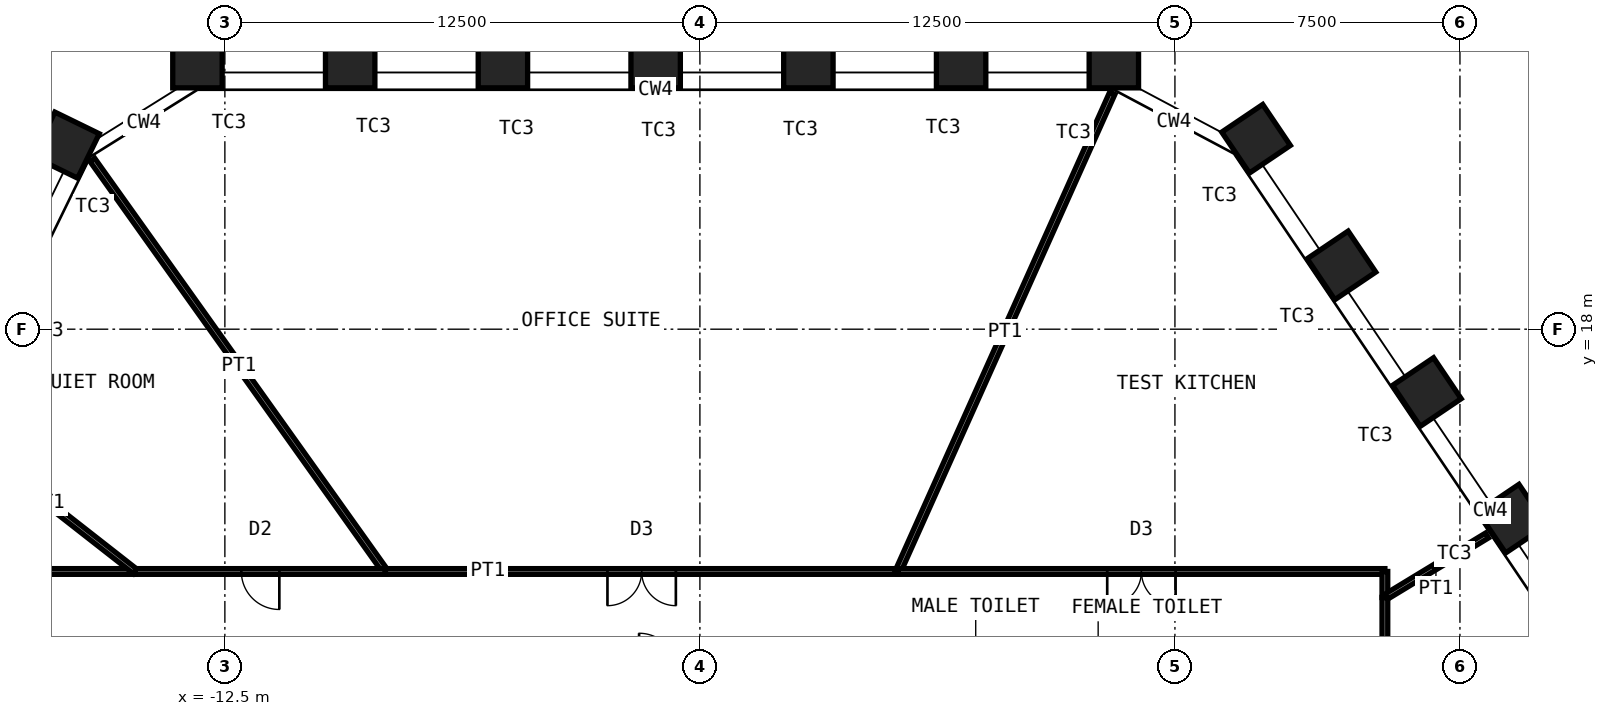
"""IFC4 building model, lengths in metres.
Left out: names, types, materials, properties, quantities, classifications, styles, units other than length and angle.
Written with IfcOpenShell. Run it as: python <this file> out.ifc"""

import sys

from ifc_helpers import new_model, si_unit, direction, frame, frame_2d, origin, origin_2d, place, context, subcontext, project, spatial, rectangle, hollow_rectangle, extrude, element, fill, save


model = new_model("IFC4")
c1 = context("Model", 3, precision=1e-05, world=origin(), true_north=direction((0.0, 1.0)))
c2 = subcontext(c1, "Body", "Model", "MODEL_VIEW")
j1 = project(units=[si_unit("LENGTHUNIT", "METRE"), si_unit("PLANEANGLEUNIT", "RADIAN")], contexts=[c1])
p1 = place(None, origin())
s1 = spatial("IfcSite", under=j1, at=p1, CompositionType="ELEMENT")
p2 = place(p1, origin())
s2 = spatial("IfcBuilding", under=s1, at=p2, CompositionType="ELEMENT")
p3 = place(p2, frame((0.0, 0.0, 119.8)))
s3 = spatial("IfcBuildingStorey", under=s2, at=p3, CompositionType="ELEMENT", Elevation=119.8)
for number, where, z_axis, x_axis in (
    (1, (-13.222, 25.0, 0.0), (0.0, 0.0, 1.0), (-1.0, 0.0, 0.0)),
    (2, (-9.203, 25.0, 0.0), (0.0, 0.0, 1.0), (-1.0, 0.0, 0.0)),
    (3, (-5.184, 25.0, 0.0), (0.0, 0.0, 1.0), (-1.0, 0.0, 0.0)),
    (4, (-1.165, 25.0, 0.0), (0.0, 0.0, 1.0), (-1.0, 0.0, 0.0)),
    (5, (2.854, 25.0, 0.0), (0.0, 0.0, 1.0), (-1.0, 0.0, 0.0)),
    (6, (6.874, 25.0, 0.0), (0.0, 0.0, 1.0), (-1.0, 0.0, 0.0)),
    (7, (10.893, 25.0, 0.0), (0.0, 0.0, 1.0), (-1.0, 0.0, 0.0)),
    (8, (14.635, 23.01, 0.0), (0.0, 0.0, 1.0), (-0.559, 0.829, 0.0)),
    (9, (16.882, 19.678, 0.0), (0.0, 0.0, 1.0), (-0.559, 0.829, 0.0)),
    (10, (19.13, 16.346, 0.0), (0.0, 0.0, 1.0), (-0.559, 0.829, 0.0)),
    (11, (21.377, 13.014, 0.0), (0.0, 0.0, 1.0), (-0.559, 0.829, 0.0)),
    (12, (-16.674, 22.843, 0.0), (0.0, 0.0, 1.0), (-0.438, -0.899, 0.0)),
):
    element("IfcColumn", number, at=place(p3, frame(where, z_axis=z_axis, x_axis=x_axis)), inside=s3, PredefinedType="COLUMN", context=c2, shape_type="SweptSolid", body=[
        extrude(hollow_rectangle(XDim=1.3, YDim=1.3, WallThickness=0.1, at=origin_2d()), origin(), (0.0, 0.0, 1.0), 4.2),
    ])
p4 = place(p3, frame((-15.987, 22.455, 0.0), z_axis=(0.0, 0.0, 1.0), x_axis=(0.579969304452, -0.814638328274, 0.0)))
e13 = element("IfcWall", 13, at=p4, inside=s3, PredefinedType="PARTITIONING", context=c2, shape_type="SweptSolid", body=[
    extrude(rectangle(XDim=13.294, YDim=0.15, at=frame_2d((6.647, 0.0))), origin(), (0.0, 0.0, 1.0), 2.93),
])
p5 = place(p3, frame((-8.277, 11.625, 0.0), z_axis=(0.0, 0.0, 1.0), x_axis=(1.0, 0.0, 0.0)))
e14 = element("IfcWall", 14, at=p5, inside=s3, PredefinedType="PARTITIONING", context=c2, shape_type="SweptSolid", body=[
    extrude(rectangle(XDim=13.488, YDim=0.15, at=frame_2d((6.744, 0.0))), origin(), (0.0, 0.0, 1.0), 4.03),
])
p6 = place(p5, frame((5.844, 0.0, 0.0)))
e15 = element("IfcOpeningElement", 15, at=p6, cuts=e14, PredefinedType="OPENING", context=c2, shape_type="SweptSolid", body=[
    extrude(rectangle(XDim=1.8, YDim=2.4, at=frame_2d((0.9, 1.2))), frame((0.0, 0.085, 0.0), z_axis=(0.0, -1.0, 0.0), x_axis=(1.0, 0.0, 0.0)), (0.0, 0.0, 1.0), 0.17),
])
p7 = place(p3, frame((10.852, 24.209, 0.0), z_axis=(0.0, 0.0, 1.0), x_axis=(-0.40904878746, -0.912512514696, 0.0)))
e16 = element("IfcWall", 16, at=p7, inside=s3, PredefinedType="PARTITIONING", context=c2, shape_type="SweptSolid", body=[
    extrude(rectangle(XDim=13.79, YDim=0.15, at=frame_2d((6.895, 0.0))), origin(), (0.0, 0.0, 1.0), 2.93),
])
p8 = place(p3, frame((5.211, 11.625, 0.0), z_axis=(0.0, 0.0, 1.0), x_axis=(1.0, 0.0, 0.0)))
e17 = element("IfcWall", 17, at=p8, inside=s3, PredefinedType="PARTITIONING", context=c2, shape_type="SweptSolid", body=[
    extrude(rectangle(XDim=12.814, YDim=0.15, at=frame_2d((6.407, 0.0))), origin(), (0.0, 0.0, 1.0), 4.03),
])
p9 = place(p8, frame((5.507, 0.0, 0.0)))
e18 = element("IfcOpeningElement", 18, at=p9, cuts=e17, PredefinedType="OPENING", context=c2, shape_type="SweptSolid", body=[
    extrude(rectangle(XDim=1.8, YDim=2.4, at=frame_2d((0.9, 1.2))), frame((0.0, 0.085, 0.0), z_axis=(0.0, -1.0, 0.0), x_axis=(1.0, 0.0, 0.0)), (0.0, 0.0, 1.0), 0.17),
])
p10 = place(p3, frame((18.025, 11.625, 0.0), z_axis=(0.0, 0.0, 1.0), x_axis=(0.0, -1.0, 0.0)))
e19 = element("IfcWall", 19, at=p10, inside=s3, PredefinedType="PARTITIONING", context=c2, shape_type="SweptSolid", body=[
    extrude(rectangle(XDim=0.684, YDim=0.15, at=frame_2d((0.342, 0.0))), origin(), (0.0, 0.0, 1.0), 4.03),
])
p11 = place(p3, frame((20.711, 12.571, 0.0), z_axis=(0.0, 0.0, 1.0), x_axis=(-0.854890890653, -0.518807830587, 0.0)))
e20 = element("IfcWall", 20, at=p11, inside=s3, PredefinedType="PARTITIONING", context=c2, shape_type="SweptSolid", body=[
    extrude(rectangle(XDim=3.143, YDim=0.15, at=frame_2d((1.571, 0.0))), origin(), (0.0, 0.0, 1.0), 3.33),
])
p12 = place(p3, frame((18.025, 10.941, 0.0), z_axis=(0.0, 0.0, 1.0), x_axis=(0.0, -1.0, 0.0)))
e21 = element("IfcWall", 21, at=p12, inside=s3, PredefinedType="PARTITIONING", context=c2, shape_type="SweptSolid", body=[
    extrude(rectangle(XDim=9.221, YDim=0.15, at=frame_2d((4.611, 0.0))), origin(), (0.0, 0.0, 1.0), 4.03),
])
p13 = place(p12, frame((3.71, 0.0, 0.0)))
e22 = element("IfcOpeningElement", 22, at=p13, cuts=e21, PredefinedType="OPENING", context=c2, shape_type="SweptSolid", body=[
    extrude(rectangle(XDim=1.8, YDim=2.4, at=frame_2d((0.9, 1.2))), frame((0.0, 0.085, 0.0), z_axis=(0.0, -1.0, 0.0), x_axis=(1.0, 0.0, 0.0)), (0.0, 0.0, 1.0), 0.17),
])
p14 = place(p3, frame((-18.625, 11.625, 0.0), z_axis=(0.0, 0.0, 1.0), x_axis=(1.0, 0.0, 0.0)))
e23 = element("IfcWall", 23, at=p14, inside=s3, PredefinedType="PARTITIONING", context=c2, shape_type="SweptSolid", body=[
    extrude(rectangle(XDim=3.768, YDim=0.15, at=frame_2d((1.884, 0.0))), origin(), (0.0, 0.0, 1.0), 4.03),
])
p15 = place(p3, frame((-19.49, 15.25, 0.0), z_axis=(0.0, 0.0, 1.0), x_axis=(0.787549668605, -0.616251182133, 0.0)))
e24 = element("IfcWall", 24, at=p15, inside=s3, PredefinedType="PARTITIONING", context=c2, shape_type="SweptSolid", body=[
    extrude(rectangle(XDim=5.882, YDim=0.15, at=frame_2d((2.941, 0.0))), origin(), (0.0, 0.0, 1.0), 3.33),
])
p16 = place(p3, frame((-14.857, 11.625, 0.0), z_axis=(0.0, 0.0, 1.0), x_axis=(1.0, 0.0, 0.0)))
e25 = element("IfcWall", 25, at=p16, inside=s3, PredefinedType="PARTITIONING", context=c2, shape_type="SweptSolid", body=[
    extrude(rectangle(XDim=6.581, YDim=0.15, at=frame_2d((3.29, 0.0))), origin(), (0.0, 0.0, 1.0), 4.03),
])
p17 = place(p16, frame((2.79, 0.0, 0.0)))
e26 = element("IfcOpeningElement", 26, at=p17, cuts=e25, PredefinedType="OPENING", context=c2, shape_type="SweptSolid", body=[
    extrude(rectangle(XDim=1.0, YDim=2.4, at=frame_2d((0.5, 1.2))), frame((0.0, 0.085, 0.0), z_axis=(0.0, -1.0, 0.0), x_axis=(1.0, 0.0, 0.0)), (0.0, 0.0, 1.0), 0.17),
])
p18 = place(p6, origin())
e27 = element("IfcDoor", 27, at=p18, inside=s3, OperationType="DOUBLE_DOOR_DOUBLE_SWING", PredefinedType="DOOR", context=c2, shape_type="SweptSolid", body=[
    extrude(rectangle(XDim=1.8, YDim=2.4, at=frame_2d((0.9, 1.2))), frame((0.0, 0.025, 0.0), z_axis=(0.0, -1.0, 0.0), x_axis=(1.0, 0.0, 0.0)), (0.0, 0.0, 1.0), 0.05),
])
fill(e15, e27)
p19 = place(p9, origin())
e28 = element("IfcDoor", 28, at=p19, inside=s3, OperationType="DOUBLE_DOOR_DOUBLE_SWING", PredefinedType="DOOR", context=c2, shape_type="SweptSolid", body=[
    extrude(rectangle(XDim=1.8, YDim=2.4, at=frame_2d((0.9, 1.2))), frame((0.0, 0.025, 0.0), z_axis=(0.0, -1.0, 0.0), x_axis=(1.0, 0.0, 0.0)), (0.0, 0.0, 1.0), 0.05),
])
fill(e18, e28)
p20 = place(p17, origin())
e29 = element("IfcDoor", 29, at=p20, inside=s3, OperationType="SINGLE_SWING_RIGHT", PredefinedType="DOOR", context=c2, shape_type="SweptSolid", body=[
    extrude(rectangle(XDim=1.0, YDim=2.4, at=frame_2d((0.5, 1.2))), frame((0.0, 0.025, 0.0), z_axis=(0.0, -1.0, 0.0), x_axis=(1.0, 0.0, 0.0)), (0.0, 0.0, 1.0), 0.05),
])
fill(e26, e29)
save(model, sys.argv[1])
